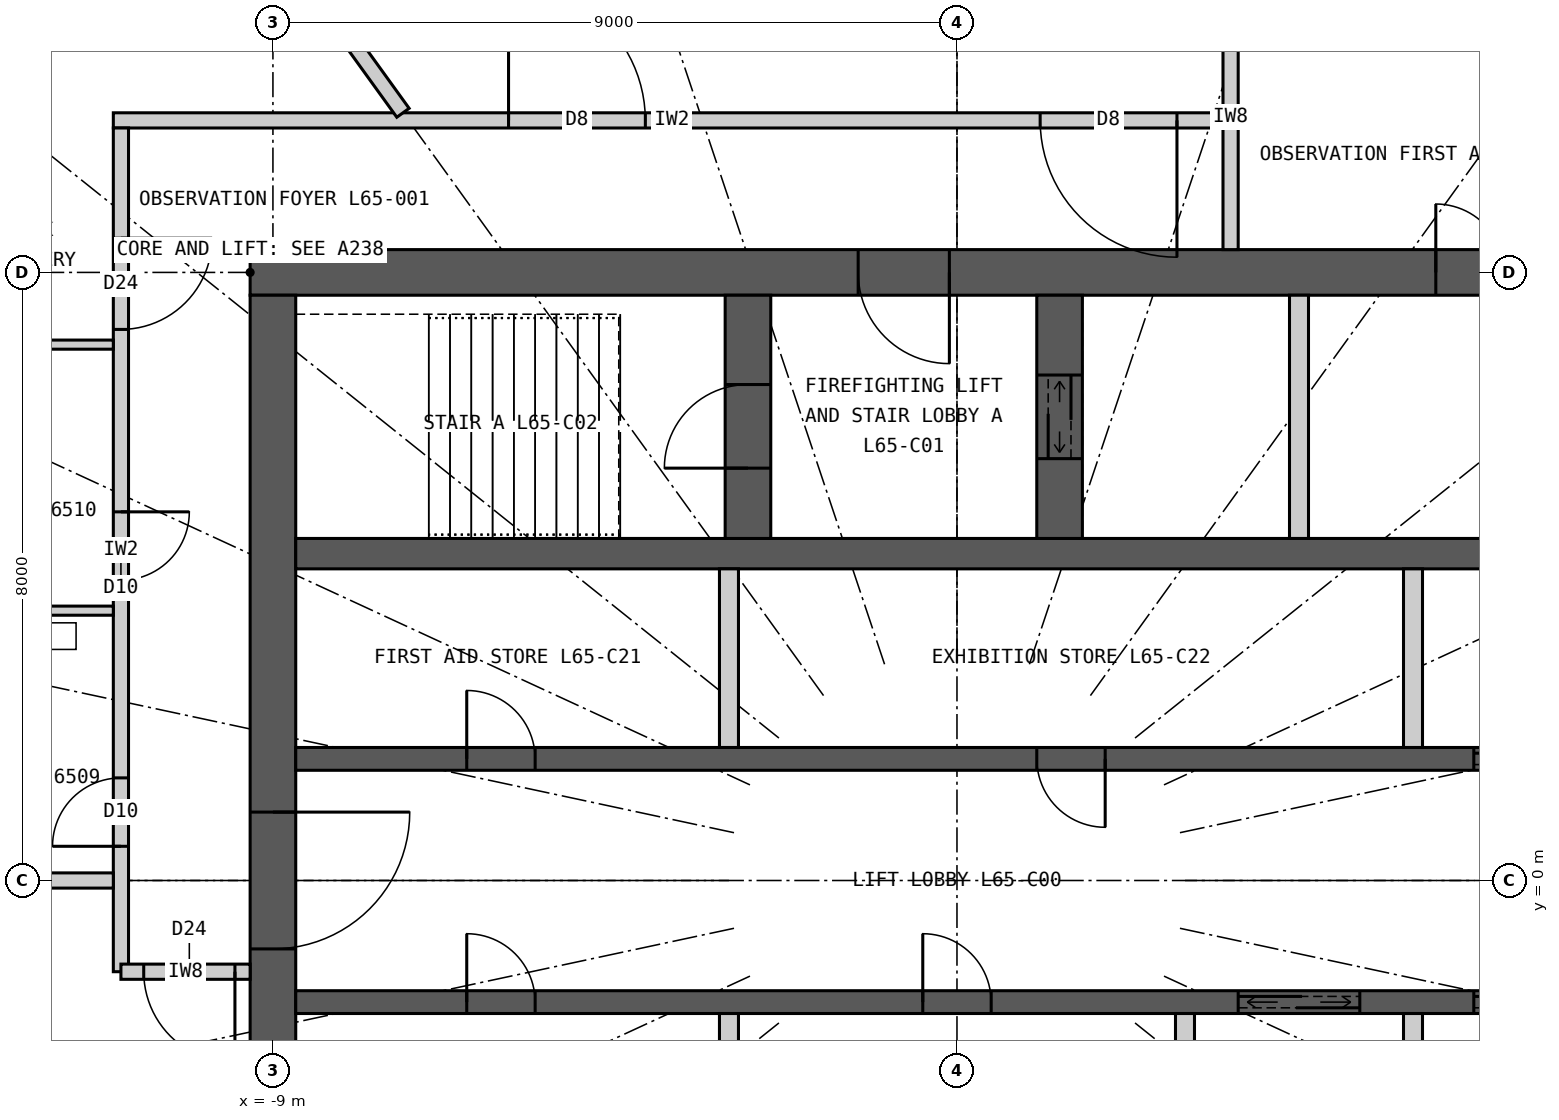
"""IFC4 building model, lengths in metres.
Left out: names, types, materials, properties, quantities, classifications, styles, units other than length and angle.
Written with IfcOpenShell. Run it as: python <this file> out.ifc"""

import sys

from ifc_helpers import new_model, si_unit, direction, frame, frame_2d, origin, place, context, subcontext, project, spatial, rectangle, extrude, element, fill, save


model = new_model("IFC4")
c1 = context("Model", 3, precision=1e-05, world=origin(), true_north=direction((0.0, 1.0)))
c2 = subcontext(c1, "Body", "Model", "MODEL_VIEW")
j1 = project(units=[si_unit("LENGTHUNIT", "METRE"), si_unit("PLANEANGLEUNIT", "RADIAN")], contexts=[c1])
p1 = place(None, origin())
s1 = spatial("IfcSite", under=j1, at=p1, CompositionType="ELEMENT")
p2 = place(p1, origin())
s2 = spatial("IfcBuilding", under=s1, at=p2, CompositionType="ELEMENT")
p3 = place(p2, frame((0.0, 0.0, 242.7)))
s3 = spatial("IfcBuildingStorey", under=s2, at=p3, CompositionType="ELEMENT", Elevation=242.7)
p4 = place(p3, frame((-9.3, 8.0, 0.0), z_axis=(0.0, 0.0, 1.0), x_axis=(1.0, 0.0, 0.0)))
e1 = element("IfcWall", 1, at=p4, inside=s3, PredefinedType="SHEAR", context=c2, shape_type="SweptSolid", body=[
    extrude(rectangle(XDim=18.6, YDim=0.6, at=frame_2d((9.3, 0.0))), origin(), (0.0, 0.0, 1.0), 6.0),
])
p5 = place(p4, frame((8.0, 0.0, 0.0)))
e2 = element("IfcOpeningElement", 2, at=p5, cuts=e1, PredefinedType="OPENING", context=c2, shape_type="SweptSolid", body=[
    extrude(rectangle(XDim=1.2, YDim=2.2, at=frame_2d((0.6, 1.1))), frame((0.0, 0.31, 0.0), z_axis=(0.0, -1.0, 0.0), x_axis=(1.0, 0.0, 0.0)), (0.0, 0.0, 1.0), 0.62),
])
p6 = place(p4, frame((15.6, 0.0, 0.0)))
e3 = element("IfcOpeningElement", 3, at=p6, cuts=e1, PredefinedType="OPENING", context=c2, shape_type="SweptSolid", body=[
    extrude(rectangle(XDim=0.9, YDim=2.2, at=frame_2d((0.45, 1.1))), frame((0.0, 0.31, 0.0), z_axis=(0.0, -1.0, 0.0), x_axis=(1.0, 0.0, 0.0)), (0.0, 0.0, 1.0), 0.62),
])
p7 = place(p3, frame((-9.0, 7.7, 0.0), z_axis=(0.0, 0.0, 1.0), x_axis=(0.0, -1.0, 0.0)))
e4 = element("IfcWall", 4, at=p7, inside=s3, PredefinedType="SHEAR", context=c2, shape_type="SweptSolid", body=[
    extrude(rectangle(XDim=15.4, YDim=0.6, at=frame_2d((7.7, 0.0))), origin(), (0.0, 0.0, 1.0), 6.0),
])
p8 = place(p7, frame((6.8, 0.0, 0.0)))
e5 = element("IfcOpeningElement", 5, at=p8, cuts=e4, PredefinedType="OPENING", context=c2, shape_type="SweptSolid", body=[
    extrude(rectangle(XDim=1.8, YDim=2.2, at=frame_2d((0.9, 1.1))), frame((0.0, 0.31, 0.0), z_axis=(0.0, -1.0, 0.0), x_axis=(1.0, 0.0, 0.0)), (0.0, 0.0, 1.0), 0.62),
])
p9 = place(p3, frame((-8.7, 4.3, 0.0), z_axis=(0.0, 0.0, 1.0), x_axis=(1.0, 0.0, 0.0)))
e6 = element("IfcWall", 6, at=p9, inside=s3, PredefinedType="SHEAR", context=c2, shape_type="SweptSolid", body=[
    extrude(rectangle(XDim=17.4, YDim=0.4, at=frame_2d((8.7, 0.0))), origin(), (0.0, 0.0, 1.0), 6.0),
])
p10 = place(p3, frame((-8.7, 1.6, 0.0), z_axis=(0.0, 0.0, 1.0), x_axis=(1.0, 0.0, 0.0)))
e7 = element("IfcWall", 7, at=p10, inside=s3, PredefinedType="SHEAR", context=c2, shape_type="SweptSolid", body=[
    extrude(rectangle(XDim=17.4, YDim=0.3, at=frame_2d((8.7, 0.0))), origin(), (0.0, 0.0, 1.0), 6.0),
])
p11 = place(p10, frame((15.5, 0.0, 0.0)))
e8 = element("IfcOpeningElement", 8, at=p11, cuts=e7, PredefinedType="OPENING", context=c2, shape_type="SweptSolid", body=[
    extrude(rectangle(XDim=1.4, YDim=2.4, at=frame_2d((0.7, 1.2))), frame((0.0, 0.16, 0.0), z_axis=(0.0, -1.0, 0.0), x_axis=(1.0, 0.0, 0.0)), (0.0, 0.0, 1.0), 0.32),
])
p12 = place(p10, frame((2.25, 0.0, 0.0)))
e9 = element("IfcOpeningElement", 9, at=p12, cuts=e7, PredefinedType="OPENING", context=c2, shape_type="SweptSolid", body=[
    extrude(rectangle(XDim=0.9, YDim=2.2, at=frame_2d((0.45, 1.1))), frame((0.0, 0.16, 0.0), z_axis=(0.0, -1.0, 0.0), x_axis=(1.0, 0.0, 0.0)), (0.0, 0.0, 1.0), 0.32),
])
p13 = place(p10, frame((9.75, 0.0, 0.0)))
e10 = element("IfcOpeningElement", 10, at=p13, cuts=e7, PredefinedType="OPENING", context=c2, shape_type="SweptSolid", body=[
    extrude(rectangle(XDim=0.9, YDim=2.2, at=frame_2d((0.45, 1.1))), frame((0.0, 0.16, 0.0), z_axis=(0.0, -1.0, 0.0), x_axis=(1.0, 0.0, 0.0)), (0.0, 0.0, 1.0), 0.32),
])
p14 = place(p3, frame((-8.7, -1.6, 0.0), z_axis=(0.0, 0.0, 1.0), x_axis=(1.0, 0.0, 0.0)))
e11 = element("IfcWall", 11, at=p14, inside=s3, PredefinedType="SHEAR", context=c2, shape_type="SweptSolid", body=[
    extrude(rectangle(XDim=17.4, YDim=0.3, at=frame_2d((8.7, 0.0))), origin(), (0.0, 0.0, 1.0), 6.0),
])
p15 = place(p14, frame((12.4, 0.0, 0.0)))
e12 = element("IfcOpeningElement", 12, at=p15, cuts=e11, PredefinedType="OPENING", context=c2, shape_type="SweptSolid", body=[
    extrude(rectangle(XDim=1.6, YDim=2.4, at=frame_2d((0.8, 1.2))), frame((0.0, 0.16, 0.0), z_axis=(0.0, -1.0, 0.0), x_axis=(1.0, 0.0, 0.0)), (0.0, 0.0, 1.0), 0.32),
])
p16 = place(p14, frame((15.5, 0.0, 0.0)))
e13 = element("IfcOpeningElement", 13, at=p16, cuts=e11, PredefinedType="OPENING", context=c2, shape_type="SweptSolid", body=[
    extrude(rectangle(XDim=1.4, YDim=2.4, at=frame_2d((0.7, 1.2))), frame((0.0, 0.16, 0.0), z_axis=(0.0, -1.0, 0.0), x_axis=(1.0, 0.0, 0.0)), (0.0, 0.0, 1.0), 0.32),
])
p17 = place(p14, frame((2.25, 0.0, 0.0)))
e14 = element("IfcOpeningElement", 14, at=p17, cuts=e11, PredefinedType="OPENING", context=c2, shape_type="SweptSolid", body=[
    extrude(rectangle(XDim=0.9, YDim=2.2, at=frame_2d((0.45, 1.1))), frame((0.0, 0.16, 0.0), z_axis=(0.0, -1.0, 0.0), x_axis=(1.0, 0.0, 0.0)), (0.0, 0.0, 1.0), 0.32),
])
p18 = place(p14, frame((8.25, 0.0, 0.0)))
e15 = element("IfcOpeningElement", 15, at=p18, cuts=e11, PredefinedType="OPENING", context=c2, shape_type="SweptSolid", body=[
    extrude(rectangle(XDim=0.9, YDim=2.2, at=frame_2d((0.45, 1.1))), frame((0.0, 0.16, 0.0), z_axis=(0.0, -1.0, 0.0), x_axis=(1.0, 0.0, 0.0)), (0.0, 0.0, 1.0), 0.32),
])
p19 = place(p3, frame((-2.75, 4.5, 0.0), z_axis=(0.0, 0.0, 1.0), x_axis=(0.0, 1.0, 0.0)))
e16 = element("IfcWall", 16, at=p19, inside=s3, PredefinedType="SHEAR", context=c2, shape_type="SweptSolid", body=[
    extrude(rectangle(XDim=3.2, YDim=0.6, at=frame_2d((1.6, 0.0))), origin(), (0.0, 0.0, 1.0), 6.0),
])
p20 = place(p19, frame((0.925, 0.0, 0.0)))
e17 = element("IfcOpeningElement", 17, at=p20, cuts=e16, PredefinedType="OPENING", context=c2, shape_type="SweptSolid", body=[
    extrude(rectangle(XDim=1.1, YDim=2.2, at=frame_2d((0.55, 1.1))), frame((0.0, 0.31, 0.0), z_axis=(0.0, -1.0, 0.0), x_axis=(1.0, 0.0, 0.0)), (0.0, 0.0, 1.0), 0.62),
])
p21 = place(p3, frame((1.35, 4.5, 0.0), z_axis=(0.0, 0.0, 1.0), x_axis=(0.0, 1.0, 0.0)))
e18 = element("IfcWall", 18, at=p21, inside=s3, PredefinedType="SHEAR", context=c2, shape_type="SweptSolid", body=[
    extrude(rectangle(XDim=3.2, YDim=0.6, at=frame_2d((1.6, 0.0))), origin(), (0.0, 0.0, 1.0), 6.0),
])
p22 = place(p21, frame((1.05, 0.0, 0.0)))
e19 = element("IfcOpeningElement", 19, at=p22, cuts=e18, PredefinedType="OPENING", context=c2, shape_type="SweptSolid", body=[
    extrude(rectangle(XDim=1.1, YDim=2.2, at=frame_2d((0.55, 1.1))), frame((0.0, 0.31, 0.0), z_axis=(0.0, -1.0, 0.0), x_axis=(1.0, 0.0, 0.0)), (0.0, 0.0, 1.0), 0.62),
])
p23 = place(p3, frame((4.5, 4.5, 0.0), z_axis=(0.0, 0.0, 1.0), x_axis=(0.0, 1.0, 0.0)))
e20 = element("IfcWall", 20, at=p23, inside=s3, PredefinedType="PARTITIONING", context=c2, shape_type="SweptSolid", body=[
    extrude(rectangle(XDim=3.2, YDim=0.25, at=frame_2d((1.6, 0.0))), origin(), (0.0, 0.0, 1.0), 6.0),
])
for number, where, z_axis, x_axis in (
    (21, (-3.0, 1.75, 0.0), (0.0, 0.0, 1.0), (0.0, 1.0, 0.0)),
    (22, (6.0, 1.75, 0.0), (0.0, 0.0, 1.0), (0.0, 1.0, 0.0)),
    (23, (-3.0, -4.1, 0.0), (0.0, 0.0, 1.0), (0.0, 1.0, 0.0)),
    (24, (3.0, -4.1, 0.0), (0.0, 0.0, 1.0), (0.0, 1.0, 0.0)),
    (25, (6.0, -4.1, 0.0), (0.0, 0.0, 1.0), (0.0, 1.0, 0.0)),
):
    element("IfcWall", number, at=place(p3, frame(where, z_axis=z_axis, x_axis=x_axis)), inside=s3, PredefinedType="PARTITIONING", context=c2, shape_type="SweptSolid", body=[
        extrude(rectangle(XDim=2.35, YDim=0.25, at=frame_2d((1.175, 0.0))), origin(), (0.0, 0.0, 1.0), 6.0),
    ])
p24 = place(p3, frame((-9.346, 12.951, 0.0), z_axis=(0.0, 0.0, 1.0), x_axis=(-0.858849230109, -0.512228464594, 0.0)))
e26 = element("IfcWall", 26, at=p24, inside=s3, PredefinedType="ELEMENTEDWALL", context=c2, shape_type="SweptSolid", body=[
    extrude(rectangle(XDim=4.564, YDim=0.15, at=frame_2d((2.282, 0.0))), origin(), (0.0, 0.0, 1.0), 5.7),
])
p25 = place(p24, frame((0.782, 0.0, 0.5)))
e27 = element("IfcOpeningElement", 27, at=p25, cuts=e26, PredefinedType="OPENING", context=c2, shape_type="SweptSolid", body=[
    extrude(rectangle(XDim=1.2, YDim=4.2, at=frame_2d((0.6, 2.1))), frame((0.0, 0.085, 0.0), z_axis=(0.0, -1.0, 0.0), x_axis=(1.0, 0.0, 0.0)), (0.0, 0.0, 1.0), 0.17),
])
p26 = place(p24, frame((2.582, 0.0, 0.5)))
e28 = element("IfcOpeningElement", 28, at=p26, cuts=e26, PredefinedType="OPENING", context=c2, shape_type="SweptSolid", body=[
    extrude(rectangle(XDim=1.2, YDim=4.2, at=frame_2d((0.6, 2.1))), frame((0.0, 0.085, 0.0), z_axis=(0.0, -1.0, 0.0), x_axis=(1.0, 0.0, 0.0)), (0.0, 0.0, 1.0), 0.17),
])
p27 = place(p3, frame((-11.1, 10.0, 0.0), z_axis=(0.0, 0.0, 1.0), x_axis=(1.0, 0.0, 0.0)))
e29 = element("IfcWall", 29, at=p27, inside=s3, PredefinedType="PARTITIONING", context=c2, shape_type="SweptSolid", body=[
    extrude(rectangle(XDim=14.7, YDim=0.2, at=frame_2d((7.35, 0.0))), origin(), (0.0, 0.0, 1.0), 5.7),
])
p28 = place(p27, frame((5.2, 0.0, 0.0)))
e30 = element("IfcOpeningElement", 30, at=p28, cuts=e29, PredefinedType="OPENING", context=c2, shape_type="SweptSolid", body=[
    extrude(rectangle(XDim=1.8, YDim=2.4, at=frame_2d((0.9, 1.2))), frame((0.0, 0.11, 0.0), z_axis=(0.0, -1.0, 0.0), x_axis=(1.0, 0.0, 0.0)), (0.0, 0.0, 1.0), 0.22),
])
p29 = place(p27, frame((12.194, 0.0, 0.0)))
e31 = element("IfcOpeningElement", 31, at=p29, cuts=e29, PredefinedType="OPENING", context=c2, shape_type="SweptSolid", body=[
    extrude(rectangle(XDim=1.8, YDim=2.4, at=frame_2d((0.9, 1.2))), frame((0.0, 0.11, 0.0), z_axis=(0.0, -1.0, 0.0), x_axis=(1.0, 0.0, 0.0)), (0.0, 0.0, 1.0), 0.22),
])
p30 = place(p3, frame((-11.0, 9.9, 0.0), z_axis=(0.0, 0.0, 1.0), x_axis=(0.0, -1.0, 0.0)))
e32 = element("IfcWall", 32, at=p30, inside=s3, PredefinedType="PARTITIONING", context=c2, shape_type="SweptSolid", body=[
    extrude(rectangle(XDim=11.1, YDim=0.2, at=frame_2d((5.55, 0.0))), origin(), (0.0, 0.0, 1.0), 5.7),
])
p31 = place(p30, frame((1.45, 0.0, 0.0)))
e33 = element("IfcOpeningElement", 33, at=p31, cuts=e32, PredefinedType="OPENING", context=c2, shape_type="SweptSolid", body=[
    extrude(rectangle(XDim=1.2, YDim=2.2, at=frame_2d((0.6, 1.1))), frame((0.0, 0.11, 0.0), z_axis=(0.0, -1.0, 0.0), x_axis=(1.0, 0.0, 0.0)), (0.0, 0.0, 1.0), 0.22),
])
p32 = place(p30, frame((8.55, 0.0, 0.0)))
e34 = element("IfcOpeningElement", 34, at=p32, cuts=e32, PredefinedType="OPENING", context=c2, shape_type="SweptSolid", body=[
    extrude(rectangle(XDim=0.9, YDim=2.1, at=frame_2d((0.45, 1.05))), frame((0.0, 0.11, 0.0), z_axis=(0.0, -1.0, 0.0), x_axis=(1.0, 0.0, 0.0)), (0.0, 0.0, 1.0), 0.22),
])
p33 = place(p30, frame((5.05, 0.0, 0.0)))
e35 = element("IfcOpeningElement", 35, at=p33, cuts=e32, PredefinedType="OPENING", context=c2, shape_type="SweptSolid", body=[
    extrude(rectangle(XDim=0.9, YDim=2.1, at=frame_2d((0.45, 1.05))), frame((0.0, 0.11, 0.0), z_axis=(0.0, -1.0, 0.0), x_axis=(1.0, 0.0, 0.0)), (0.0, 0.0, 1.0), 0.22),
])
p34 = place(p3, frame((-7.289, 10.1, 0.0), z_axis=(0.0, 0.0, 1.0), x_axis=(-0.585199887706, 0.810889074676, 0.0)))
e36 = element("IfcWall", 36, at=p34, inside=s3, PredefinedType="PARTITIONING", context=c2, shape_type="SweptSolid", body=[
    extrude(rectangle(XDim=2.607, YDim=0.2, at=frame_2d((1.303, 0.0))), origin(), (0.0, 0.0, 1.0), 4.85),
])
p35 = place(p3, frame((-11.1, 0.0, 0.0), z_axis=(0.0, 0.0, 1.0), x_axis=(-1.0, 0.0, 0.0)))
e37 = element("IfcWall", 37, at=p35, inside=s3, PredefinedType="PARTITIONING", context=c2, shape_type="SweptSolid", body=[
    extrude(rectangle(XDim=6.9, YDim=0.2, at=frame_2d((3.45, 0.0))), origin(), (0.0, 0.0, 1.0), 4.85),
])
p36 = place(p3, frame((-9.3, -1.2, 0.0), z_axis=(0.0, 0.0, 1.0), x_axis=(-1.0, 0.0, 0.0)))
e38 = element("IfcWall", 38, at=p36, inside=s3, PredefinedType="PARTITIONING", context=c2, shape_type="SweptSolid", body=[
    extrude(rectangle(XDim=1.7, YDim=0.2, at=frame_2d((0.85, 0.0))), origin(), (0.0, 0.0, 1.0), 5.7),
])
p37 = place(p36, frame((0.2, 0.0, 0.0)))
e39 = element("IfcOpeningElement", 39, at=p37, cuts=e38, PredefinedType="OPENING", context=c2, shape_type="SweptSolid", body=[
    extrude(rectangle(XDim=1.2, YDim=2.2, at=frame_2d((0.6, 1.1))), frame((0.0, 0.11, 0.0), z_axis=(0.0, -1.0, 0.0), x_axis=(1.0, 0.0, 0.0)), (0.0, 0.0, 1.0), 0.22),
])
p38 = place(p3, frame((3.6, 8.3, 0.0), z_axis=(0.0, 0.0, 1.0), x_axis=(0.0, 1.0, 0.0)))
e40 = element("IfcWall", 40, at=p38, inside=s3, PredefinedType="PARTITIONING", context=c2, shape_type="SweptSolid", body=[
    extrude(rectangle(XDim=3.5, YDim=0.2, at=frame_2d((1.75, 0.0))), origin(), (0.0, 0.0, 1.0), 5.7),
])
for number, where, z_axis, x_axis in (
    (41, (-11.1, 3.55, 0.0), (0.0, 0.0, 1.0), (-1.0, 0.0, 0.0)),
    (42, (-11.1, 7.05, 0.0), (0.0, 0.0, 1.0), (-1.0, 0.0, 0.0)),
):
    element("IfcWall", number, at=place(p3, frame(where, z_axis=z_axis, x_axis=x_axis)), inside=s3, PredefinedType="PARTITIONING", context=c2, shape_type="SweptSolid", body=[
        extrude(rectangle(XDim=3.54, YDim=0.12, at=frame_2d((1.77, 0.0))), origin(), (0.0, 0.0, 1.0), 5.7),
    ])
p39 = place(p28, origin())
e43 = element("IfcDoor", 43, at=p39, inside=s3, OperationType="DOUBLE_DOOR_DOUBLE_SWING", PredefinedType="DOOR", context=c2, shape_type="SweptSolid", body=[
    extrude(rectangle(XDim=1.8, YDim=2.4, at=frame_2d((0.9, 1.2))), frame((0.0, 0.025, 0.0), z_axis=(0.0, -1.0, 0.0), x_axis=(1.0, 0.0, 0.0)), (0.0, 0.0, 1.0), 0.05),
])
fill(e30, e43)
p40 = place(p37, origin())
e44 = element("IfcDoor", 44, at=p40, inside=s3, OperationType="SINGLE_SWING_LEFT", PredefinedType="DOOR", context=c2, shape_type="SweptSolid", body=[
    extrude(rectangle(XDim=1.2, YDim=2.2, at=frame_2d((0.6, 1.1))), frame((0.0, 0.025, 0.0), z_axis=(0.0, -1.0, 0.0), x_axis=(1.0, 0.0, 0.0)), (0.0, 0.0, 1.0), 0.05),
])
fill(e39, e44)
p41 = place(p31, origin())
e45 = element("IfcDoor", 45, at=p41, inside=s3, OperationType="SINGLE_SWING_LEFT", PredefinedType="DOOR", context=c2, shape_type="SweptSolid", body=[
    extrude(rectangle(XDim=1.2, YDim=2.2, at=frame_2d((0.6, 1.1))), frame((0.0, 0.025, 0.0), z_axis=(0.0, -1.0, 0.0), x_axis=(1.0, 0.0, 0.0)), (0.0, 0.0, 1.0), 0.05),
])
fill(e33, e45)
p42 = place(p32, origin())
e46 = element("IfcDoor", 46, at=p42, inside=s3, OperationType="SINGLE_SWING_RIGHT", PredefinedType="DOOR", context=c2, shape_type="SweptSolid", body=[
    extrude(rectangle(XDim=0.9, YDim=2.1, at=frame_2d((0.45, 1.05))), frame((0.0, 0.025, 0.0), z_axis=(0.0, -1.0, 0.0), x_axis=(1.0, 0.0, 0.0)), (0.0, 0.0, 1.0), 0.05),
])
fill(e34, e46)
p43 = place(p33, origin())
e47 = element("IfcDoor", 47, at=p43, inside=s3, OperationType="SINGLE_SWING_LEFT", PredefinedType="DOOR", context=c2, shape_type="SweptSolid", body=[
    extrude(rectangle(XDim=0.9, YDim=2.1, at=frame_2d((0.45, 1.05))), frame((0.0, 0.025, 0.0), z_axis=(0.0, -1.0, 0.0), x_axis=(1.0, 0.0, 0.0)), (0.0, 0.0, 1.0), 0.05),
])
fill(e35, e47)
p44 = place(p5, origin())
e48 = element("IfcDoor", 48, at=p44, inside=s3, OperationType="SINGLE_SWING_RIGHT", PredefinedType="DOOR", context=c2, shape_type="SweptSolid", body=[
    extrude(rectangle(XDim=1.2, YDim=2.2, at=frame_2d((0.6, 1.1))), frame((0.0, 0.025, 0.0), z_axis=(0.0, -1.0, 0.0), x_axis=(1.0, 0.0, 0.0)), (0.0, 0.0, 1.0), 0.05),
])
fill(e2, e48)
p45 = place(p20, origin())
e49 = element("IfcDoor", 49, at=p45, inside=s3, OperationType="SINGLE_SWING_LEFT", PredefinedType="DOOR", context=c2, shape_type="SweptSolid", body=[
    extrude(rectangle(XDim=1.1, YDim=2.2, at=frame_2d((0.55, 1.1))), frame((0.0, 0.025, 0.0), z_axis=(0.0, -1.0, 0.0), x_axis=(1.0, 0.0, 0.0)), (0.0, 0.0, 1.0), 0.05),
])
fill(e17, e49)
p46 = place(p22, origin())
e50 = element("IfcDoor", 50, at=p46, inside=s3, OperationType="DOUBLE_DOOR_SLIDING", PredefinedType="DOOR", context=c2, shape_type="SweptSolid", body=[
    extrude(rectangle(XDim=1.1, YDim=2.2, at=frame_2d((0.55, 1.1))), frame((0.0, 0.025, 0.0), z_axis=(0.0, -1.0, 0.0), x_axis=(1.0, 0.0, 0.0)), (0.0, 0.0, 1.0), 0.05),
])
fill(e19, e50)
p47 = place(p6, origin())
e51 = element("IfcDoor", 51, at=p47, inside=s3, OperationType="SINGLE_SWING_LEFT", PredefinedType="DOOR", context=c2, shape_type="SweptSolid", body=[
    extrude(rectangle(XDim=0.9, YDim=2.2, at=frame_2d((0.45, 1.1))), frame((0.0, 0.025, 0.0), z_axis=(0.0, -1.0, 0.0), x_axis=(1.0, 0.0, 0.0)), (0.0, 0.0, 1.0), 0.05),
])
fill(e3, e51)
p48 = place(p11, origin())
e52 = element("IfcDoor", 52, at=p48, inside=s3, OperationType="DOUBLE_DOOR_SLIDING", PredefinedType="DOOR", context=c2, shape_type="SweptSolid", body=[
    extrude(rectangle(XDim=1.4, YDim=2.4, at=frame_2d((0.7, 1.2))), frame((0.0, 0.025, 0.0), z_axis=(0.0, -1.0, 0.0), x_axis=(1.0, 0.0, 0.0)), (0.0, 0.0, 1.0), 0.05),
])
fill(e8, e52)
p49 = place(p15, origin())
e53 = element("IfcDoor", 53, at=p49, inside=s3, OperationType="DOUBLE_DOOR_SLIDING", PredefinedType="DOOR", context=c2, shape_type="SweptSolid", body=[
    extrude(rectangle(XDim=1.6, YDim=2.4, at=frame_2d((0.8, 1.2))), frame((0.0, 0.025, 0.0), z_axis=(0.0, -1.0, 0.0), x_axis=(1.0, 0.0, 0.0)), (0.0, 0.0, 1.0), 0.05),
])
fill(e12, e53)
p50 = place(p16, origin())
e54 = element("IfcDoor", 54, at=p50, inside=s3, OperationType="DOUBLE_DOOR_SLIDING", PredefinedType="DOOR", context=c2, shape_type="SweptSolid", body=[
    extrude(rectangle(XDim=1.4, YDim=2.4, at=frame_2d((0.7, 1.2))), frame((0.0, 0.025, 0.0), z_axis=(0.0, -1.0, 0.0), x_axis=(1.0, 0.0, 0.0)), (0.0, 0.0, 1.0), 0.05),
])
fill(e13, e54)
p51 = place(p12, origin())
e55 = element("IfcDoor", 55, at=p51, inside=s3, OperationType="SINGLE_SWING_LEFT", PredefinedType="DOOR", context=c2, shape_type="SweptSolid", body=[
    extrude(rectangle(XDim=0.9, YDim=2.2, at=frame_2d((0.45, 1.1))), frame((0.0, 0.025, 0.0), z_axis=(0.0, -1.0, 0.0), x_axis=(1.0, 0.0, 0.0)), (0.0, 0.0, 1.0), 0.05),
])
fill(e9, e55)
p52 = place(p13, origin())
e56 = element("IfcDoor", 56, at=p52, inside=s3, OperationType="SINGLE_SWING_RIGHT", PredefinedType="DOOR", context=c2, shape_type="SweptSolid", body=[
    extrude(rectangle(XDim=0.9, YDim=2.2, at=frame_2d((0.45, 1.1))), frame((0.0, 0.025, 0.0), z_axis=(0.0, -1.0, 0.0), x_axis=(1.0, 0.0, 0.0)), (0.0, 0.0, 1.0), 0.05),
])
fill(e10, e56)
p53 = place(p17, origin())
e57 = element("IfcDoor", 57, at=p53, inside=s3, OperationType="SINGLE_SWING_LEFT", PredefinedType="DOOR", context=c2, shape_type="SweptSolid", body=[
    extrude(rectangle(XDim=0.9, YDim=2.2, at=frame_2d((0.45, 1.1))), frame((0.0, 0.025, 0.0), z_axis=(0.0, -1.0, 0.0), x_axis=(1.0, 0.0, 0.0)), (0.0, 0.0, 1.0), 0.05),
])
fill(e14, e57)
p54 = place(p18, origin())
e58 = element("IfcDoor", 58, at=p54, inside=s3, OperationType="SINGLE_SWING_LEFT", PredefinedType="DOOR", context=c2, shape_type="SweptSolid", body=[
    extrude(rectangle(XDim=0.9, YDim=2.2, at=frame_2d((0.45, 1.1))), frame((0.0, 0.025, 0.0), z_axis=(0.0, -1.0, 0.0), x_axis=(1.0, 0.0, 0.0)), (0.0, 0.0, 1.0), 0.05),
])
fill(e15, e58)
p55 = place(p8, origin())
e59 = element("IfcDoor", 59, at=p55, inside=s3, OperationType="DOUBLE_DOOR_DOUBLE_SWING", PredefinedType="DOOR", context=c2, shape_type="SweptSolid", body=[
    extrude(rectangle(XDim=1.8, YDim=2.2, at=frame_2d((0.9, 1.1))), frame((0.0, 0.025, 0.0), z_axis=(0.0, -1.0, 0.0), x_axis=(1.0, 0.0, 0.0)), (0.0, 0.0, 1.0), 0.05),
])
fill(e5, e59)
p56 = place(p29, origin())
e60 = element("IfcDoor", 60, at=p56, inside=s3, OperationType="DOUBLE_DOOR_DOUBLE_SWING", PredefinedType="DOOR", context=c2, shape_type="SweptSolid", body=[
    extrude(rectangle(XDim=1.8, YDim=2.4, at=frame_2d((0.9, 1.2))), frame((0.0, 0.025, 0.0), z_axis=(0.0, -1.0, 0.0), x_axis=(1.0, 0.0, 0.0)), (0.0, 0.0, 1.0), 0.05),
])
fill(e31, e60)
save(model, sys.argv[1])
